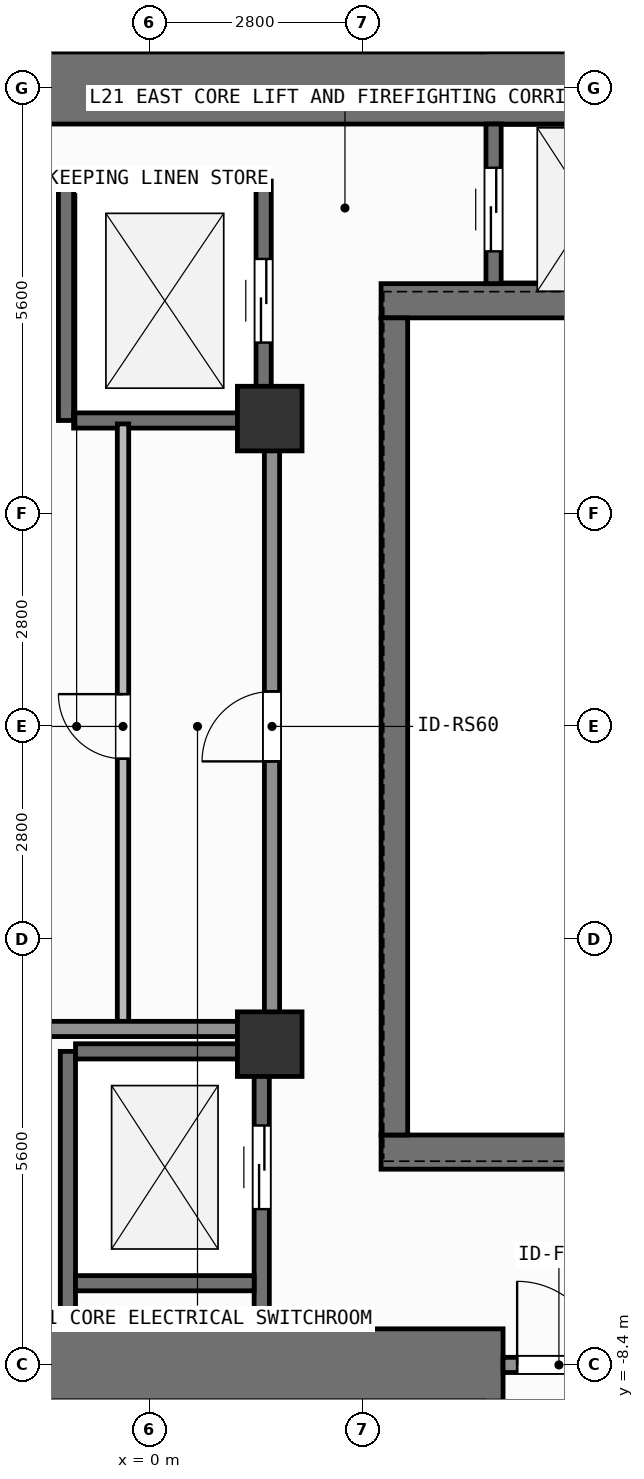
"""IFC4 building model, lengths in metres.
Left out: names, types, materials, properties, quantities, classifications, styles, units other than length and angle.
Written with IfcOpenShell. Run it as: python <this file> out.ifc"""

import sys

from ifc_helpers import new_model, si_unit, direction, frame, frame_2d, origin, origin_2d, place, context, subcontext, project, spatial, rectangle, extrude, element, fill, save


model = new_model("IFC4")
c1 = context("Model", 3, precision=1e-05, world=origin(), true_north=direction((0.0, 1.0)))
c2 = subcontext(c1, "Body", "Model", "MODEL_VIEW")
j1 = project(units=[si_unit("LENGTHUNIT", "METRE"), si_unit("PLANEANGLEUNIT", "RADIAN")], contexts=[c1])
p1 = place(None, origin())
s1 = spatial("IfcSite", under=j1, at=p1, CompositionType="ELEMENT")
p2 = place(p1, origin())
s2 = spatial("IfcBuilding", under=s1, at=p2, CompositionType="ELEMENT")
p3 = place(p2, frame((0.0, 0.0, 85.2)))
s3 = spatial("IfcBuildingStorey", under=s2, at=p3, CompositionType="ELEMENT", Elevation=85.2)
p4 = place(p3, frame((-2.62, -8.4, 0.0), z_axis=(0.0, 0.0, 1.0), x_axis=(1.0, 0.0, 0.0)))
e1 = element("IfcWall", 1, at=p4, inside=s3, PredefinedType="SHEAR", context=c2, shape_type="SweptSolid", body=[
    extrude(rectangle(XDim=7.27, YDim=0.95, at=frame_2d((3.635, 0.0))), origin(), (0.0, 0.0, 1.0), 3.9),
])
p5 = place(p3, frame((-7.55, 8.4, 0.0), z_axis=(0.0, 0.0, 1.0), x_axis=(1.0, 0.0, 0.0)))
e2 = element("IfcWall", 2, at=p5, inside=s3, PredefinedType="SHEAR", context=c2, shape_type="SweptSolid", body=[
    extrude(rectangle(XDim=16.425, YDim=0.95, at=frame_2d((8.212, 0.0))), origin(), (0.0, 0.0, 1.0), 3.9),
])
for number, where, z_axis, x_axis in (
    (3, (3.045, -5.6, 0.0), (0.0, 0.0, 1.0), (1.0, 0.0, 0.0)),
    (4, (3.045, 5.6, 0.0), (0.0, 0.0, 1.0), (1.0, 0.0, 0.0)),
):
    element("IfcWall", number, at=place(p3, frame(where, z_axis=z_axis, x_axis=x_axis)), inside=s3, PredefinedType="SHEAR", context=c2, shape_type="SweptSolid", body=[
        extrude(rectangle(XDim=5.83, YDim=0.45, at=frame_2d((2.915, 0.0))), origin(), (0.0, 0.0, 1.0), 3.9),
    ])
p6 = place(p3, frame((3.22, -5.375, 0.0), z_axis=(0.0, 0.0, 1.0), x_axis=(0.0, 1.0, 0.0)))
e5 = element("IfcWall", 5, at=p6, inside=s3, PredefinedType="SHEAR", context=c2, shape_type="SweptSolid", body=[
    extrude(rectangle(XDim=10.75, YDim=0.35, at=frame_2d((5.375, 0.0))), origin(), (0.0, 0.0, 1.0), 3.9),
])
for number, where, z_axis, x_axis in (
    (6, (1.58, -4.18, 0.0), (0.0, 0.0, 1.0), (1.0, 0.0, 0.0)),
    (7, (1.58, 4.05, 0.0), (0.0, 0.0, 1.0), (1.0, 0.0, 0.0)),
):
    element("IfcColumn", number, at=place(p3, frame(where, z_axis=z_axis, x_axis=x_axis)), inside=s3, PredefinedType="COLUMN", context=c2, shape_type="SweptSolid", body=[
        extrude(rectangle(XDim=0.85, YDim=0.85, at=origin_2d()), origin(), (0.0, 0.0, 1.0), 3.9),
    ])
p7 = place(p3, frame((-1.1, 4.025, 0.0), z_axis=(0.0, 0.0, 1.0), x_axis=(0.0, 1.0, 0.0)))
e8 = element("IfcWall", 8, at=p7, inside=s3, PredefinedType="SHEAR", context=c2, shape_type="SweptSolid", body=[
    extrude(rectangle(XDim=3.15, YDim=0.2, at=frame_2d((1.575, 0.0))), origin(), (0.0, 0.0, 1.0), 3.68),
])
p8 = place(p3, frame((1.5, 4.025, 0.0), z_axis=(0.0, 0.0, 1.0), x_axis=(0.0, 1.0, 0.0)))
e9 = element("IfcWall", 9, at=p8, inside=s3, PredefinedType="SHEAR", context=c2, shape_type="SweptSolid", body=[
    extrude(rectangle(XDim=3.15, YDim=0.2, at=frame_2d((1.575, 0.0))), origin(), (0.0, 0.0, 1.0), 3.68),
])
p9 = place(p8, frame((1.025, 0.0, 0.0)))
e10 = element("IfcOpeningElement", 10, at=p9, cuts=e9, PredefinedType="OPENING", context=c2, shape_type="SweptSolid", body=[
    extrude(rectangle(XDim=1.1, YDim=2.2, at=frame_2d((0.55, 1.1))), frame((0.0, 0.11, 0.0), z_axis=(0.0, -1.0, 0.0), x_axis=(1.0, 0.0, 0.0)), (0.0, 0.0, 1.0), 0.22),
])
for number, where, z_axis, x_axis in (
    (11, (-1.0, 4.025, 0.0), (0.0, 0.0, 1.0), (1.0, 0.0, 0.0)),
    (12, (-1.0, 7.175, 0.0), (0.0, 0.0, 1.0), (1.0, 0.0, 0.0)),
):
    element("IfcWall", number, at=place(p3, frame(where, z_axis=z_axis, x_axis=x_axis)), inside=s3, PredefinedType="SHEAR", context=c2, shape_type="SweptSolid", body=[
        extrude(rectangle(XDim=2.4, YDim=0.2, at=frame_2d((1.2, 0.0))), origin(), (0.0, 0.0, 1.0), 3.68),
    ])
p10 = place(p3, frame((-1.075, -7.925, 0.0), z_axis=(0.0, 0.0, 1.0), x_axis=(0.0, 1.0, 0.0)))
e13 = element("IfcWall", 13, at=p10, inside=s3, PredefinedType="SHEAR", context=c2, shape_type="SweptSolid", body=[
    extrude(rectangle(XDim=3.65, YDim=0.2, at=frame_2d((1.825, 0.0))), origin(), (0.0, 0.0, 1.0), 3.68),
])
p11 = place(p3, frame((1.475, -7.925, 0.0), z_axis=(0.0, 0.0, 1.0), x_axis=(0.0, 1.0, 0.0)))
e14 = element("IfcWall", 14, at=p11, inside=s3, PredefinedType="SHEAR", context=c2, shape_type="SweptSolid", body=[
    extrude(rectangle(XDim=3.65, YDim=0.2, at=frame_2d((1.825, 0.0))), origin(), (0.0, 0.0, 1.0), 3.68),
])
p12 = place(p11, frame((1.575, 0.0, 0.0)))
e15 = element("IfcOpeningElement", 15, at=p12, cuts=e14, PredefinedType="OPENING", context=c2, shape_type="SweptSolid", body=[
    extrude(rectangle(XDim=1.1, YDim=2.2, at=frame_2d((0.55, 1.1))), frame((0.0, 0.11, 0.0), z_axis=(0.0, -1.0, 0.0), x_axis=(1.0, 0.0, 0.0)), (0.0, 0.0, 1.0), 0.22),
])
for number, where, z_axis, x_axis in (
    (16, (-0.975, -7.325, 0.0), (0.0, 0.0, 1.0), (1.0, 0.0, 0.0)),
    (17, (-0.975, -4.275, 0.0), (0.0, 0.0, 1.0), (1.0, 0.0, 0.0)),
):
    element("IfcWall", number, at=place(p3, frame(where, z_axis=z_axis, x_axis=x_axis)), inside=s3, PredefinedType="SHEAR", context=c2, shape_type="SweptSolid", body=[
        extrude(rectangle(XDim=2.35, YDim=0.2, at=frame_2d((1.175, 0.0))), origin(), (0.0, 0.0, 1.0), 3.68),
    ])
p13 = place(p3, frame((4.525, 5.825, 0.0), z_axis=(0.0, 0.0, 1.0), x_axis=(0.0, 1.0, 0.0)))
e18 = element("IfcWall", 18, at=p13, inside=s3, PredefinedType="SHEAR", context=c2, shape_type="SweptSolid", body=[
    extrude(rectangle(XDim=2.1, YDim=0.2, at=frame_2d((1.05, 0.0))), origin(), (0.0, 0.0, 1.0), 3.68),
])
p14 = place(p13, frame((0.425, 0.0, 0.0)))
e19 = element("IfcOpeningElement", 19, at=p14, cuts=e18, PredefinedType="OPENING", context=c2, shape_type="SweptSolid", body=[
    extrude(rectangle(XDim=1.1, YDim=2.2, at=frame_2d((0.55, 1.1))), frame((0.0, 0.11, 0.0), z_axis=(0.0, -1.0, 0.0), x_axis=(1.0, 0.0, 0.0)), (0.0, 0.0, 1.0), 0.22),
])
p15 = place(p3, frame((4.65, -8.4, 0.0), z_axis=(0.0, 0.0, 1.0), x_axis=(1.0, 0.0, 0.0)))
e20 = element("IfcWall", 20, at=p15, inside=s3, PredefinedType="SOLIDWALL", context=c2, shape_type="SweptSolid", body=[
    extrude(rectangle(XDim=1.47, YDim=0.2, at=frame_2d((0.735, 0.0))), origin(), (0.0, 0.0, 1.0), 2.72),
])
p16 = place(p15, frame((0.185, 0.0, 0.0)))
e21 = element("IfcOpeningElement", 21, at=p16, cuts=e20, PredefinedType="OPENING", context=c2, shape_type="SweptSolid", body=[
    extrude(rectangle(XDim=1.1, YDim=2.15, at=frame_2d((0.55, 1.075))), frame((0.0, 0.11, 0.0), z_axis=(0.0, -1.0, 0.0), x_axis=(1.0, 0.0, 0.0)), (0.0, 0.0, 1.0), 0.22),
])
p17 = place(p3, frame((-0.35, -3.98, 0.0), z_axis=(0.0, 0.0, 1.0), x_axis=(0.0, 1.0, 0.0)))
e22 = element("IfcWall", 22, at=p17, inside=s3, PredefinedType="PARTITIONING", context=c2, shape_type="SweptSolid", body=[
    extrude(rectangle(XDim=7.96, YDim=0.15, at=frame_2d((3.98, 0.0))), origin(), (0.0, 0.0, 1.0), 3.68),
])
p18 = place(p17, frame((3.555, 0.0, 0.0)))
e23 = element("IfcOpeningElement", 23, at=p18, cuts=e22, PredefinedType="OPENING", context=c2, shape_type="SweptSolid", body=[
    extrude(rectangle(XDim=0.85, YDim=2.1, at=frame_2d((0.425, 1.05))), frame((0.0, 0.085, 0.0), z_axis=(0.0, -1.0, 0.0), x_axis=(1.0, 0.0, 0.0)), (0.0, 0.0, 1.0), 0.17),
])
p19 = place(p3, frame((1.61, -3.98, 0.0), z_axis=(0.0, 0.0, 1.0), x_axis=(0.0, 1.0, 0.0)))
e24 = element("IfcWall", 24, at=p19, inside=s3, PredefinedType="SOLIDWALL", context=c2, shape_type="SweptSolid", body=[
    extrude(rectangle(XDim=7.96, YDim=0.2, at=frame_2d((3.98, 0.0))), origin(), (0.0, 0.0, 1.0), 3.68),
])
p20 = place(p19, frame((3.52, 0.0, 0.0)))
e25 = element("IfcOpeningElement", 25, at=p20, cuts=e24, PredefinedType="OPENING", context=c2, shape_type="SweptSolid", body=[
    extrude(rectangle(XDim=0.92, YDim=2.1, at=frame_2d((0.46, 1.05))), frame((0.0, 0.11, 0.0), z_axis=(0.0, -1.0, 0.0), x_axis=(1.0, 0.0, 0.0)), (0.0, 0.0, 1.0), 0.22),
])
p21 = place(p3, frame((-1.58, -3.98, 0.0), z_axis=(0.0, 0.0, 1.0), x_axis=(1.0, 0.0, 0.0)))
e26 = element("IfcWall", 26, at=p21, inside=s3, PredefinedType="SOLIDWALL", context=c2, shape_type="SweptSolid", body=[
    extrude(rectangle(XDim=3.19, YDim=0.2, at=frame_2d((1.595, 0.0))), origin(), (0.0, 0.0, 1.0), 3.68),
])
p22 = place(p9, origin())
e27 = element("IfcDoor", 27, at=p22, inside=s3, OperationType="SLIDING_TO_LEFT", PredefinedType="DOOR", context=c2, shape_type="SweptSolid", body=[
    extrude(rectangle(XDim=1.1, YDim=2.2, at=frame_2d((0.55, 1.1))), frame((0.0, 0.025, 0.0), z_axis=(0.0, -1.0, 0.0), x_axis=(1.0, 0.0, 0.0)), (0.0, 0.0, 1.0), 0.05),
])
fill(e10, e27)
p23 = place(p12, origin())
e28 = element("IfcDoor", 28, at=p23, inside=s3, OperationType="SLIDING_TO_LEFT", PredefinedType="DOOR", context=c2, shape_type="SweptSolid", body=[
    extrude(rectangle(XDim=1.1, YDim=2.2, at=frame_2d((0.55, 1.1))), frame((0.0, 0.025, 0.0), z_axis=(0.0, -1.0, 0.0), x_axis=(1.0, 0.0, 0.0)), (0.0, 0.0, 1.0), 0.05),
])
fill(e15, e28)
p24 = place(p14, origin())
e29 = element("IfcDoor", 29, at=p24, inside=s3, OperationType="SLIDING_TO_LEFT", PredefinedType="DOOR", context=c2, shape_type="SweptSolid", body=[
    extrude(rectangle(XDim=1.1, YDim=2.2, at=frame_2d((0.55, 1.1))), frame((0.0, 0.025, 0.0), z_axis=(0.0, -1.0, 0.0), x_axis=(1.0, 0.0, 0.0)), (0.0, 0.0, 1.0), 0.05),
])
fill(e19, e29)
p25 = place(p16, origin())
e30 = element("IfcDoor", 30, at=p25, inside=s3, OperationType="SINGLE_SWING_LEFT", PredefinedType="DOOR", context=c2, shape_type="SweptSolid", body=[
    extrude(rectangle(XDim=1.1, YDim=2.15, at=frame_2d((0.55, 1.075))), frame((0.0, 0.025, 0.0), z_axis=(0.0, -1.0, 0.0), x_axis=(1.0, 0.0, 0.0)), (0.0, 0.0, 1.0), 0.05),
])
fill(e21, e30)
p26 = place(p18, origin())
e31 = element("IfcDoor", 31, at=p26, inside=s3, OperationType="SINGLE_SWING_RIGHT", PredefinedType="DOOR", context=c2, shape_type="SweptSolid", body=[
    extrude(rectangle(XDim=0.85, YDim=2.1, at=frame_2d((0.425, 1.05))), frame((0.0, 0.025, 0.0), z_axis=(0.0, -1.0, 0.0), x_axis=(1.0, 0.0, 0.0)), (0.0, 0.0, 1.0), 0.05),
])
fill(e23, e31)
p27 = place(p20, origin())
e32 = element("IfcDoor", 32, at=p27, inside=s3, OperationType="SINGLE_SWING_LEFT", PredefinedType="DOOR", context=c2, shape_type="SweptSolid", body=[
    extrude(rectangle(XDim=0.92, YDim=2.1, at=frame_2d((0.46, 1.05))), frame((0.0, 0.025, 0.0), z_axis=(0.0, -1.0, 0.0), x_axis=(1.0, 0.0, 0.0)), (0.0, 0.0, 1.0), 0.05),
])
fill(e25, e32)
save(model, sys.argv[1])
